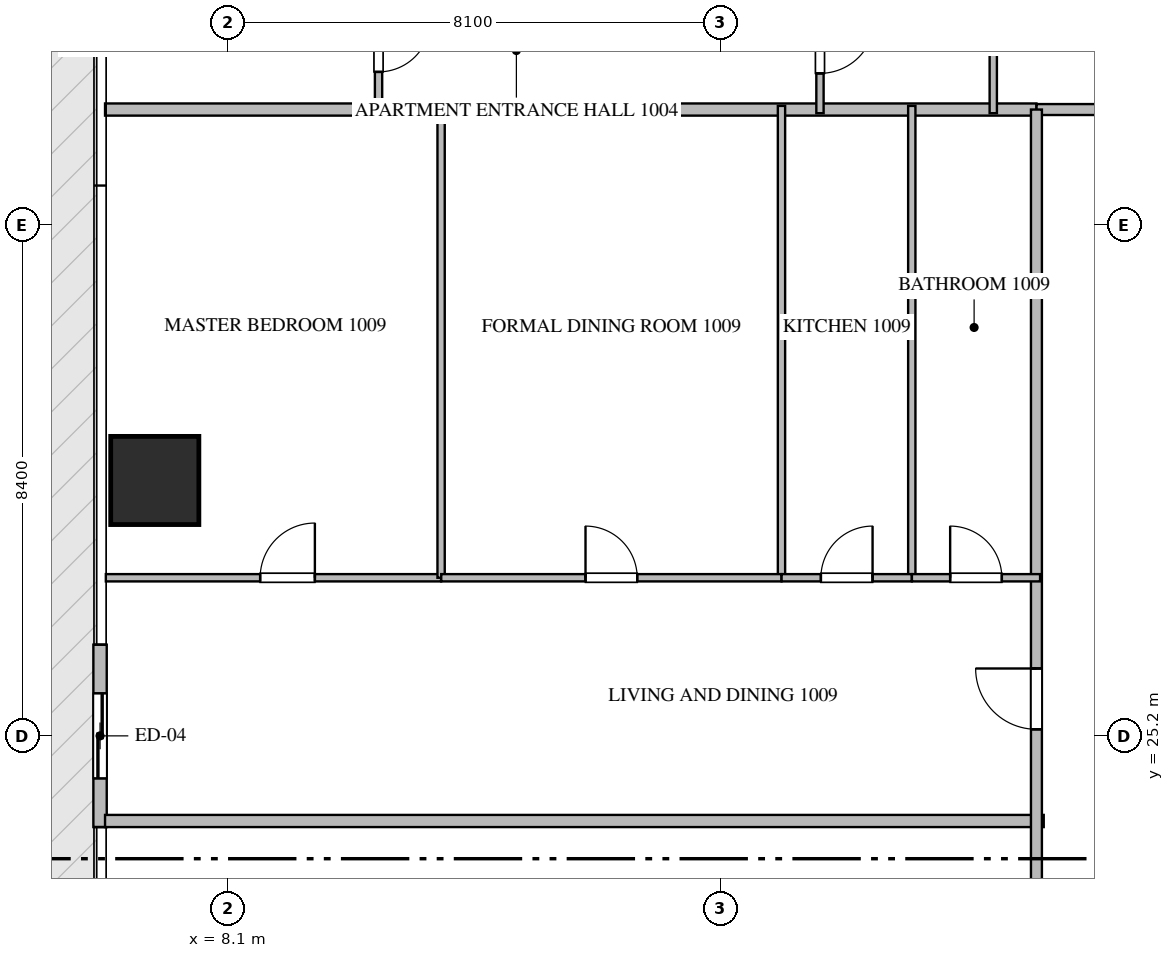
"""IFC4 building model, lengths in metres.
Left out: names, types, materials, properties, quantities, classifications, styles, units other than length and angle.
Written with IfcOpenShell. Run it as: python <this file> out.ifc"""

import sys

from ifc_helpers import new_model, si_unit, direction, frame, frame_2d, origin, origin_2d, place, context, subcontext, project, spatial, rectangle, extrude, source, transform, mapped, element, fill, save


model = new_model("IFC4")
c1 = context("Model", 3, precision=1e-05, world=origin(), true_north=direction((0.0, 1.0)))
c2 = subcontext(c1, "Body", "Model", "MODEL_VIEW")
j1 = project(units=[si_unit("LENGTHUNIT", "METRE"), si_unit("PLANEANGLEUNIT", "RADIAN")], contexts=[c1])
p1 = place(None, origin())
s1 = spatial("IfcSite", under=j1, at=p1, CompositionType="ELEMENT")
p2 = place(p1, origin())
s2 = spatial("IfcBuilding", under=s1, at=p2, CompositionType="ELEMENT")
p3 = place(p2, frame((0.0, 0.0, 45.45)))
s3 = spatial("IfcBuildingStorey", under=s2, at=p3, CompositionType="ELEMENT", Elevation=45.45)
m1 = source(origin(), c2, "Body", "SweptSolid", [
    extrude(rectangle(XDim=1.45, YDim=1.45, at=origin_2d()), origin(), (0.0, 0.0, 1.0), 3.75),
])
p4 = place(p3, frame((6.9, 29.4, -0.26), z_axis=(0.0, 0.0, 1.0), x_axis=(1.0, 0.0, 0.0)))
e1 = element("IfcColumn", 1, at=p4, inside=s3, PredefinedType="COLUMN", context=c2, shape_type="MappedRepresentation", body=[
    mapped(m1, transform((0.0, 0.0, 0.0), scale=1.0)),
])
p5 = place(p3, frame((6.0, 26.7, 0.0), z_axis=(0.0, 0.0, 1.0), x_axis=(0.0, -1.0, 0.0)))
e2 = element("IfcWall", 2, at=p5, inside=s3, PredefinedType="ELEMENTEDWALL", context=c2, shape_type="SweptSolid", body=[
    extrude(rectangle(XDim=3.0, YDim=0.22, at=frame_2d((1.5, 0.0))), origin(), (0.0, 0.0, 1.0), 3.475),
])
p6 = place(p5, frame((0.8, 0.0, 0.0)))
e3 = element("IfcOpeningElement", 3, at=p6, cuts=e2, PredefinedType="OPENING", context=c2, shape_type="SweptSolid", body=[
    extrude(rectangle(XDim=1.4, YDim=2.25, at=frame_2d((0.7, 1.125))), frame((0.0, 0.12, 0.0), z_axis=(0.0, -1.0, 0.0), x_axis=(1.0, 0.0, 0.0)), (0.0, 0.0, 1.0), 0.24),
])
p7 = place(p3, frame((6.082, 23.8, 0.0), z_axis=(0.0, 0.0, 1.0), x_axis=(1.0, 0.0, 0.0)))
e4 = element("IfcWall", 4, at=p7, inside=s3, PredefinedType="PARTITIONING", context=c2, shape_type="SweptSolid", body=[
    extrude(rectangle(XDim=15.438, YDim=0.2, at=frame_2d((7.719, 0.0))), origin(), (0.0, 0.0, 1.0), 3.49),
])
p8 = place(p3, frame((6.082, 35.5, 0.0), z_axis=(0.0, 0.0, 1.0), x_axis=(1.0, 0.0, 0.0)))
e5 = element("IfcWall", 5, at=p8, inside=s3, PredefinedType="PARTITIONING", context=c2, shape_type="SweptSolid", body=[
    extrude(rectangle(XDim=15.318, YDim=0.2, at=frame_2d((7.659, 0.0))), origin(), (0.0, 0.0, 1.0), 3.49),
])
p9 = place(p3, frame((21.402, 35.5, 0.0), z_axis=(0.0, 0.0, 1.0), x_axis=(1.0, 0.0, 0.0)))
e6 = element("IfcWall", 6, at=p9, inside=s3, PredefinedType="PARTITIONING", context=c2, shape_type="SweptSolid", body=[
    extrude(rectangle(XDim=21.996, YDim=0.18, at=frame_2d((10.998, 0.0))), origin(), (0.0, 0.0, 1.0), 3.49),
])
p10 = place(p9, frame((2.1, 0.0, 0.0)))
e7 = element("IfcOpeningElement", 7, at=p10, cuts=e6, PredefinedType="OPENING", context=c2, shape_type="SweptSolid", body=[
    extrude(rectangle(XDim=1.0, YDim=2.15, at=frame_2d((0.5, 1.075))), frame((0.0, 0.1, 0.0), z_axis=(0.0, -1.0, 0.0), x_axis=(1.0, 0.0, 0.0)), (0.0, 0.0, 1.0), 0.2),
])
p11 = place(p9, frame((5.333, 0.0, 0.0)))
e8 = element("IfcOpeningElement", 8, at=p11, cuts=e6, PredefinedType="OPENING", context=c2, shape_type="SweptSolid", body=[
    extrude(rectangle(XDim=1.0, YDim=2.15, at=frame_2d((0.5, 1.075))), frame((0.0, 0.1, 0.0), z_axis=(0.0, -1.0, 0.0), x_axis=(1.0, 0.0, 0.0)), (0.0, 0.0, 1.0), 0.2),
])
p12 = place(p9, frame((11.842, 0.0, 0.0)))
e9 = element("IfcOpeningElement", 9, at=p12, cuts=e6, PredefinedType="OPENING", context=c2, shape_type="SweptSolid", body=[
    extrude(rectangle(XDim=1.0, YDim=2.15, at=frame_2d((0.5, 1.075))), frame((0.0, 0.1, 0.0), z_axis=(0.0, -1.0, 0.0), x_axis=(1.0, 0.0, 0.0)), (0.0, 0.0, 1.0), 0.2),
])
p13 = place(p9, frame((18.896, 0.0, 0.0)))
e10 = element("IfcOpeningElement", 10, at=p13, cuts=e6, PredefinedType="OPENING", context=c2, shape_type="SweptSolid", body=[
    extrude(rectangle(XDim=1.0, YDim=2.15, at=frame_2d((0.5, 1.075))), frame((0.0, 0.1, 0.0), z_axis=(0.0, -1.0, 0.0), x_axis=(1.0, 0.0, 0.0)), (0.0, 0.0, 1.0), 0.2),
])
p14 = place(p3, frame((21.4, 14.9, 0.0), z_axis=(0.0, 0.0, 1.0), x_axis=(0.0, 1.0, 0.0)))
e11 = element("IfcWall", 11, at=p14, inside=s3, PredefinedType="PARTITIONING", context=c2, shape_type="SweptSolid", body=[
    extrude(rectangle(XDim=20.6, YDim=0.18, at=frame_2d((10.3, 0.0))), origin(), (0.0, 0.0, 1.0), 3.49),
])
p15 = place(p14, frame((5.331, 0.0, 0.0)))
e12 = element("IfcOpeningElement", 12, at=p15, cuts=e11, PredefinedType="OPENING", context=c2, shape_type="SweptSolid", body=[
    extrude(rectangle(XDim=1.0, YDim=2.15, at=frame_2d((0.5, 1.075))), frame((0.0, 0.1, 0.0), z_axis=(0.0, -1.0, 0.0), x_axis=(1.0, 0.0, 0.0)), (0.0, 0.0, 1.0), 0.2),
])
p16 = place(p14, frame((10.408, 0.0, 0.0)))
e13 = element("IfcOpeningElement", 13, at=p16, cuts=e11, PredefinedType="OPENING", context=c2, shape_type="SweptSolid", body=[
    extrude(rectangle(XDim=1.0, YDim=2.15, at=frame_2d((0.5, 1.075))), frame((0.0, 0.1, 0.0), z_axis=(0.0, -1.0, 0.0), x_axis=(1.0, 0.0, 0.0)), (0.0, 0.0, 1.0), 0.2),
])
p17 = place(p3, frame((20.69, 38.25, 0.0), z_axis=(0.0, 0.0, 1.0), x_axis=(0.0, -1.0, 0.0)))
e14 = element("IfcWall", 14, at=p17, inside=s3, PredefinedType="PARTITIONING", context=c2, shape_type="SweptSolid", body=[
    extrude(rectangle(XDim=2.81, YDim=0.12, at=frame_2d((1.405, 0.0))), origin(), (0.0, 0.0, 1.0), 3.49),
])
p18 = place(p3, frame((17.84, 37.65, 0.0), z_axis=(0.0, 0.0, 1.0), x_axis=(0.0, -1.0, 0.0)))
e15 = element("IfcWall", 15, at=p18, inside=s3, PredefinedType="PARTITIONING", context=c2, shape_type="SweptSolid", body=[
    extrude(rectangle(XDim=2.21, YDim=0.12, at=frame_2d((1.105, 0.0))), origin(), (0.0, 0.0, 1.0), 3.49),
])
p19 = place(p18, frame((0.655, 0.0, 0.0)))
e16 = element("IfcOpeningElement", 16, at=p19, cuts=e15, PredefinedType="OPENING", context=c2, shape_type="SweptSolid", body=[
    extrude(rectangle(XDim=0.9, YDim=2.1, at=frame_2d((0.45, 1.05))), frame((0.0, 0.07, 0.0), z_axis=(0.0, -1.0, 0.0), x_axis=(1.0, 0.0, 0.0)), (0.0, 0.0, 1.0), 0.14),
])
p20 = place(p3, frame((10.58, 37.648, 0.0), z_axis=(0.0, 0.0, 1.0), x_axis=(0.0, -1.0, 0.0)))
e17 = element("IfcWall", 17, at=p20, inside=s3, PredefinedType="PARTITIONING", context=c2, shape_type="SweptSolid", body=[
    extrude(rectangle(XDim=2.208, YDim=0.12, at=frame_2d((1.104, 0.0))), origin(), (0.0, 0.0, 1.0), 3.49),
])
p21 = place(p20, frame((0.679, 0.0, 0.0)))
e18 = element("IfcOpeningElement", 18, at=p21, cuts=e17, PredefinedType="OPENING", context=c2, shape_type="SweptSolid", body=[
    extrude(rectangle(XDim=0.85, YDim=2.1, at=frame_2d((0.425, 1.05))), frame((0.0, 0.07, 0.0), z_axis=(0.0, -1.0, 0.0), x_axis=(1.0, 0.0, 0.0)), (0.0, 0.0, 1.0), 0.14),
])
p22 = place(p3, frame((6.095, 27.8, 0.0), z_axis=(0.0, 0.0, 1.0), x_axis=(1.0, 0.0, 0.0)))
e19 = element("IfcWall", 19, at=p22, inside=s3, PredefinedType="PARTITIONING", context=c2, shape_type="SweptSolid", body=[
    extrude(rectangle(XDim=5.514, YDim=0.12, at=frame_2d((2.757, 0.0))), origin(), (0.0, 0.0, 1.0), 3.49),
])
p23 = place(p22, frame((2.538, 0.0, 0.0)))
e20 = element("IfcOpeningElement", 20, at=p23, cuts=e19, PredefinedType="OPENING", context=c2, shape_type="SweptSolid", body=[
    extrude(rectangle(XDim=0.9, YDim=2.1, at=frame_2d((0.45, 1.05))), frame((0.0, 0.07, 0.0), z_axis=(0.0, -1.0, 0.0), x_axis=(1.0, 0.0, 0.0)), (0.0, 0.0, 1.0), 0.14),
])
for number, where, z_axis, x_axis in (
    (21, (11.609, 27.8, 0.0), (0.0, 0.0, 1.0), (0.0, 1.0, 0.0)),
    (22, (17.207, 27.8, 0.0), (0.0, 0.0, 1.0), (0.0, 1.0, 0.0)),
    (23, (19.35, 27.8, 0.0), (0.0, 0.0, 1.0), (0.0, 1.0, 0.0)),
):
    element("IfcWall", number, at=place(p3, frame(where, z_axis=z_axis, x_axis=x_axis)), inside=s3, PredefinedType="PARTITIONING", context=c2, shape_type="SweptSolid", body=[
        extrude(rectangle(XDim=7.76, YDim=0.12, at=frame_2d((3.88, 0.0))), origin(), (0.0, 0.0, 1.0), 3.49),
    ])
p24 = place(p3, frame((11.611, 27.8, 0.0), z_axis=(0.0, 0.0, 1.0), x_axis=(1.0, 0.0, 0.0)))
e24 = element("IfcWall", 24, at=p24, inside=s3, PredefinedType="PARTITIONING", context=c2, shape_type="SweptSolid", body=[
    extrude(rectangle(XDim=5.596, YDim=0.12, at=frame_2d((2.798, 0.0))), origin(), (0.0, 0.0, 1.0), 3.49),
])
p25 = place(p24, frame((2.373, 0.0, 0.0)))
e25 = element("IfcOpeningElement", 25, at=p25, cuts=e24, PredefinedType="OPENING", context=c2, shape_type="SweptSolid", body=[
    extrude(rectangle(XDim=0.85, YDim=2.1, at=frame_2d((0.425, 1.05))), frame((0.0, 0.07, 0.0), z_axis=(0.0, -1.0, 0.0), x_axis=(1.0, 0.0, 0.0)), (0.0, 0.0, 1.0), 0.14),
])
p26 = place(p3, frame((17.209, 27.8, 0.0), z_axis=(0.0, 0.0, 1.0), x_axis=(1.0, 0.0, 0.0)))
e26 = element("IfcWall", 26, at=p26, inside=s3, PredefinedType="PARTITIONING", context=c2, shape_type="SweptSolid", body=[
    extrude(rectangle(XDim=2.141, YDim=0.12, at=frame_2d((1.071, 0.0))), origin(), (0.0, 0.0, 1.0), 3.49),
])
p27 = place(p26, frame((0.646, 0.0, 0.0)))
e27 = element("IfcOpeningElement", 27, at=p27, cuts=e26, PredefinedType="OPENING", context=c2, shape_type="SweptSolid", body=[
    extrude(rectangle(XDim=0.85, YDim=2.1, at=frame_2d((0.425, 1.05))), frame((0.0, 0.07, 0.0), z_axis=(0.0, -1.0, 0.0), x_axis=(1.0, 0.0, 0.0)), (0.0, 0.0, 1.0), 0.14),
])
p28 = place(p3, frame((19.352, 27.8, 0.0), z_axis=(0.0, 0.0, 1.0), x_axis=(1.0, 0.0, 0.0)))
e28 = element("IfcWall", 28, at=p28, inside=s3, PredefinedType="PARTITIONING", context=c2, shape_type="SweptSolid", body=[
    extrude(rectangle(XDim=2.108, YDim=0.12, at=frame_2d((1.054, 0.0))), origin(), (0.0, 0.0, 1.0), 3.49),
])
p29 = place(p28, frame((0.629, 0.0, 0.0)))
e29 = element("IfcOpeningElement", 29, at=p29, cuts=e28, PredefinedType="OPENING", context=c2, shape_type="SweptSolid", body=[
    extrude(rectangle(XDim=0.85, YDim=2.1, at=frame_2d((0.425, 1.05))), frame((0.0, 0.07, 0.0), z_axis=(0.0, -1.0, 0.0), x_axis=(1.0, 0.0, 0.0)), (0.0, 0.0, 1.0), 0.14),
])
m2 = source(origin(), c2, "Body", "SweptSolid", [
    extrude(rectangle(XDim=1.4, YDim=2.25, at=frame_2d((0.7, 1.125))), frame((0.0, 0.025, 0.0), z_axis=(0.0, -1.0, 0.0), x_axis=(1.0, 0.0, 0.0)), (0.0, 0.0, 1.0), 0.05),
])
p30 = place(p6, origin())
e30 = element("IfcDoor", 30, at=p30, inside=s3, OperationType="SLIDING_TO_LEFT", PredefinedType="DOOR", context=c2, shape_type="MappedRepresentation", body=[
    mapped(m2, transform((0.0, 0.0, 0.0), scale=1.0)),
])
fill(e3, e30)
m3 = source(origin(), c2, "Body", "SweptSolid", [
    extrude(rectangle(XDim=1.0, YDim=2.15, at=frame_2d((0.5, 1.075))), frame((0.0, 0.025, 0.0), z_axis=(0.0, -1.0, 0.0), x_axis=(1.0, 0.0, 0.0)), (0.0, 0.0, 1.0), 0.05),
])
p31 = place(p16, origin())
e31 = element("IfcDoor", 31, at=p31, inside=s3, OperationType="SINGLE_SWING_RIGHT", PredefinedType="DOOR", context=c2, shape_type="MappedRepresentation", body=[
    mapped(m3, transform((0.0, 0.0, 0.0), scale=1.0)),
])
fill(e13, e31)
m4 = source(origin(), c2, "Body", "SweptSolid", [
    extrude(rectangle(XDim=0.9, YDim=2.1, at=frame_2d((0.45, 1.05))), frame((0.0, 0.025, 0.0), z_axis=(0.0, -1.0, 0.0), x_axis=(1.0, 0.0, 0.0)), (0.0, 0.0, 1.0), 0.05),
])
p32 = place(p19, origin())
e32 = element("IfcDoor", 32, at=p32, inside=s3, OperationType="SINGLE_SWING_LEFT", PredefinedType="DOOR", context=c2, shape_type="MappedRepresentation", body=[
    mapped(m4, transform((0.0, 0.0, 0.0), scale=1.0)),
])
fill(e16, e32)
m5 = source(origin(), c2, "Body", "SweptSolid", [
    extrude(rectangle(XDim=0.85, YDim=2.1, at=frame_2d((0.425, 1.05))), frame((0.0, 0.025, 0.0), z_axis=(0.0, -1.0, 0.0), x_axis=(1.0, 0.0, 0.0)), (0.0, 0.0, 1.0), 0.05),
])
p33 = place(p21, origin())
e33 = element("IfcDoor", 33, at=p33, inside=s3, OperationType="SINGLE_SWING_LEFT", PredefinedType="DOOR", context=c2, shape_type="MappedRepresentation", body=[
    mapped(m5, transform((0.0, 0.0, 0.0), scale=1.0)),
])
fill(e18, e33)
p34 = place(p23, origin())
e34 = element("IfcDoor", 34, at=p34, inside=s3, OperationType="SINGLE_SWING_RIGHT", PredefinedType="DOOR", context=c2, shape_type="MappedRepresentation", body=[
    mapped(m4, transform((0.0, 0.0, 0.0), scale=1.0)),
])
fill(e20, e34)
p35 = place(p25, origin())
e35 = element("IfcDoor", 35, at=p35, inside=s3, OperationType="SINGLE_SWING_LEFT", PredefinedType="DOOR", context=c2, shape_type="MappedRepresentation", body=[
    mapped(m5, transform((0.0, 0.0, 0.0), scale=1.0)),
])
fill(e25, e35)
p36 = place(p27, origin())
e36 = element("IfcDoor", 36, at=p36, inside=s3, OperationType="SINGLE_SWING_RIGHT", PredefinedType="DOOR", context=c2, shape_type="MappedRepresentation", body=[
    mapped(m5, transform((0.0, 0.0, 0.0), scale=1.0)),
])
fill(e27, e36)
p37 = place(p29, origin())
e37 = element("IfcDoor", 37, at=p37, inside=s3, OperationType="SINGLE_SWING_LEFT", PredefinedType="DOOR", context=c2, shape_type="MappedRepresentation", body=[
    mapped(m5, transform((0.0, 0.0, 0.0), scale=1.0)),
])
fill(e29, e37)
save(model, sys.argv[1])
